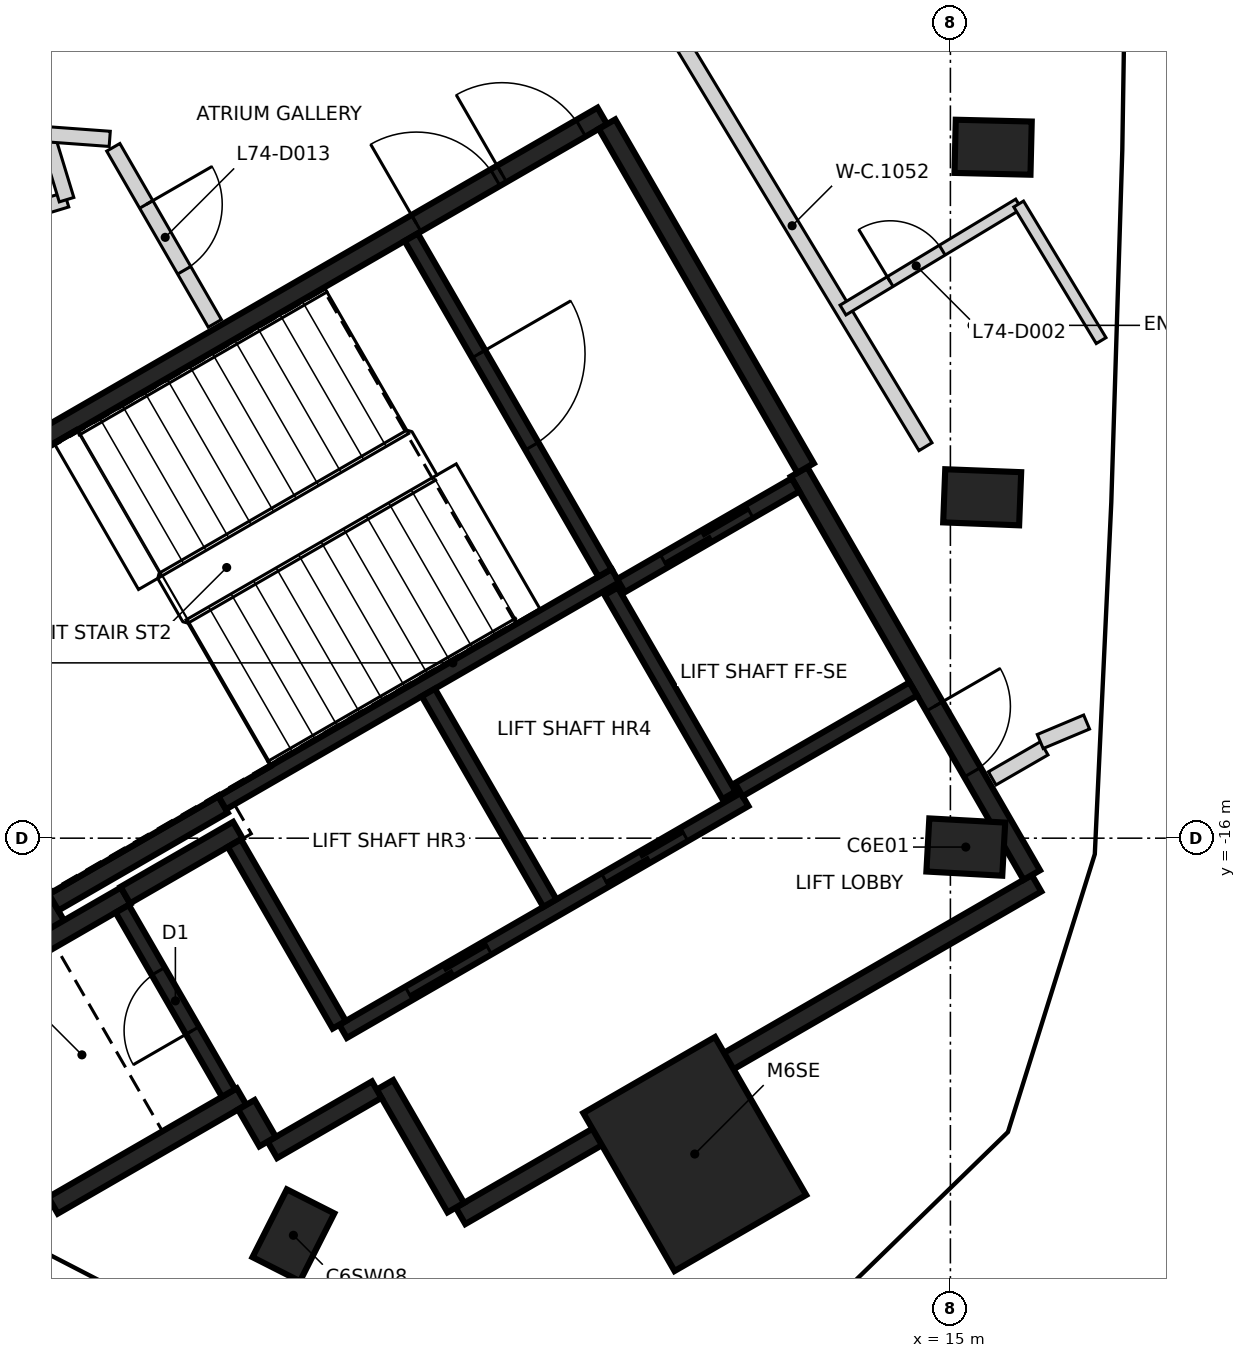
"""IFC4 building model, lengths in metres.
Left out: names, types, materials, properties, quantities, classifications, styles, units other than length and angle.
Written with IfcOpenShell. Run it as: python <this file> out.ifc"""

import sys

from ifc_helpers import new_model, si_unit, direction, frame, frame_2d, origin, origin_2d, place, context, subcontext, project, spatial, rectangle, extrude, element, fill, save


model = new_model("IFC4")
c1 = context("Model", 3, precision=1e-05, world=origin(), true_north=direction((0.0, 1.0)))
c2 = subcontext(c1, "Body", "Model", "MODEL_VIEW")
j1 = project(units=[si_unit("LENGTHUNIT", "METRE"), si_unit("PLANEANGLEUNIT", "RADIAN")], contexts=[c1])
p1 = place(None, origin())
s1 = spatial("IfcSite", under=j1, at=p1, CompositionType="ELEMENT")
p2 = place(p1, origin())
s2 = spatial("IfcBuilding", under=s1, at=p2, CompositionType="ELEMENT")
p3 = place(p2, frame((0.0, 0.0, 294.6)))
s3 = spatial("IfcBuildingStorey", under=s2, at=p3, CompositionType="ELEMENT", Elevation=294.6)
for number, where, z_axis, x_axis in (
    (1, (15.202, -16.117, -0.35), (0.0, 0.0, 1.0), (-0.998, 0.055, 0.0)),
    (2, (15.418, -11.515, -0.35), (0.0, 0.0, 1.0), (-0.999, 0.039, 0.0)),
    (3, (15.562, -6.91, -0.35), (0.0, 0.0, 1.0), (-1.0, 0.024, 0.0)),
    (4, (6.356, -21.224, -0.35), (0.0, 0.0, 1.0), (0.452, 0.892, 0.0)),
):
    element("IfcColumn", number, at=place(p3, frame(where, z_axis=z_axis, x_axis=x_axis)), inside=s3, PredefinedType="COLUMN", context=c2, shape_type="SweptSolid", body=[
        extrude(rectangle(XDim=1.0, YDim=0.7, at=origin_2d()), origin(), (0.0, 0.0, 1.0), 3.6),
    ])
p4 = place(p3, frame((11.637, -20.155, -0.35), z_axis=(0.0, 0.0, 1.0), x_axis=(-0.5, 0.866025403784, 0.0)))
e5 = element("IfcColumn", 5, at=p4, inside=s3, PredefinedType="COLUMN", context=c2, shape_type="SweptSolid", body=[
    extrude(rectangle(XDim=2.4, YDim=2.0, at=origin_2d()), origin(), (0.0, 0.0, 1.0), 3.6),
])
p5 = place(p3, frame((0.417, -12.273, 0.0), z_axis=(0.0, 0.0, 1.0), x_axis=(0.866021906294, 0.500006057782, 0.0)))
e6 = element("IfcWall", 6, at=p5, inside=s3, PredefinedType="SHEAR", context=c2, shape_type="SweptSolid", body=[
    extrude(rectangle(XDim=11.55, YDim=0.25, at=frame_2d((5.775, 0.0))), origin(), (0.0, 0.0, 1.0), 3.25),
])
p6 = place(p5, frame((10.025, 0.0, 0.0)))
e7 = element("IfcOpeningElement", 7, at=p6, cuts=e6, PredefinedType="OPENING", context=c2, shape_type="SweptSolid", body=[
    extrude(rectangle(XDim=1.2, YDim=2.1, at=frame_2d((0.6, 1.05))), frame((0.0, 0.135, 0.0), z_axis=(0.0, -1.0, 0.0), x_axis=(1.0, 0.0, 0.0)), (0.0, 0.0, 1.0), 0.27),
])
p7 = place(p5, frame((8.725, 0.0, 0.0)))
e8 = element("IfcOpeningElement", 8, at=p7, cuts=e6, PredefinedType="OPENING", context=c2, shape_type="SweptSolid", body=[
    extrude(rectangle(XDim=1.2, YDim=2.1, at=frame_2d((0.6, 1.05))), frame((0.0, 0.135, 0.0), z_axis=(0.0, -1.0, 0.0), x_axis=(1.0, 0.0, 0.0)), (0.0, 0.0, 1.0), 0.27),
])
p8 = place(p3, frame((16.133, -16.594, 0.0), z_axis=(0.0, 0.0, 1.0), x_axis=(-0.866022959057, -0.500004234368, 0.0)))
e9 = element("IfcWall", 9, at=p8, inside=s3, PredefinedType="SHEAR", context=c2, shape_type="SweptSolid", body=[
    extrude(rectangle(XDim=8.75, YDim=0.25, at=frame_2d((4.375, 0.0))), origin(), (0.0, 0.0, 1.0), 3.25),
])
p9 = place(p3, frame((13.008, -11.181, 0.0), z_axis=(0.0, 0.0, 1.0), x_axis=(0.500001955336, -0.866024274868, 0.0)))
e10 = element("IfcWall", 10, at=p9, inside=s3, PredefinedType="SHEAR", context=c2, shape_type="SweptSolid", body=[
    extrude(rectangle(XDim=6.125, YDim=0.25, at=frame_2d((3.062, 0.0))), origin(), (0.0, 0.0, 1.0), 3.25),
])
p10 = place(p9, frame((3.563, 0.0, 0.0)))
e11 = element("IfcOpeningElement", 11, at=p10, cuts=e10, PredefinedType="OPENING", context=c2, shape_type="SweptSolid", body=[
    extrude(rectangle(XDim=1.0, YDim=2.1, at=frame_2d((0.5, 1.05))), frame((0.0, 0.135, 0.0), z_axis=(0.0, -1.0, 0.0), x_axis=(1.0, 0.0, 0.0)), (0.0, 0.0, 1.0), 0.27),
])
p11 = place(p3, frame((3.235, -17.153, 0.0), z_axis=(0.0, 0.0, 1.0), x_axis=(-0.500008851346, 0.866020293397, 0.0)))
e12 = element("IfcWall", 12, at=p11, inside=s3, PredefinedType="SHEAR", context=c2, shape_type="SweptSolid", body=[
    extrude(rectangle(XDim=5.51, YDim=0.25, at=frame_2d((2.755, 0.0))), origin(), (0.0, 0.0, 1.0), 3.25),
])
p12 = place(p3, frame((10.483, -6.606, 0.0), z_axis=(0.0, 0.0, 1.0), x_axis=(0.49999885962, -0.866026062182, 0.0)))
e13 = element("IfcWall", 13, at=p12, inside=s3, PredefinedType="SHEAR", context=c2, shape_type="SweptSolid", body=[
    extrude(rectangle(XDim=5.225, YDim=0.25, at=frame_2d((2.612, 0.0))), origin(), (0.0, 0.0, 1.0), 3.25),
])
p13 = place(p3, frame((3.085, -20.894, 0.0), z_axis=(0.0, 0.0, 1.0), x_axis=(-0.499978833458, 0.866037623948, 0.0)))
e14 = element("IfcWall", 14, at=p13, inside=s3, PredefinedType="SHEAR", context=c2, shape_type="SweptSolid", body=[
    extrude(rectangle(XDim=3.05, YDim=0.25, at=frame_2d((1.525, 0.0))), origin(), (0.0, 0.0, 1.0), 3.25),
])
p14 = place(p3, frame((1.669, -18.19, 0.0), z_axis=(0.0, 0.0, 1.0), x_axis=(0.866042235819, 0.499970844928, 0.0)))
e15 = element("IfcWall", 15, at=p14, inside=s3, PredefinedType="SHEAR", context=c2, shape_type="SweptSolid", body=[
    extrude(rectangle(XDim=2.865, YDim=0.25, at=frame_2d((1.432, 0.0))), origin(), (0.0, 0.0, 1.0), 3.25),
])
p15 = place(p3, frame((5.675, -19.399, 0.0), z_axis=(0.0, 0.0, 1.0), x_axis=(-0.866026637627, -0.499997862916, 0.0)))
e16 = element("IfcWall", 16, at=p15, inside=s3, PredefinedType="SHEAR", context=c2, shape_type="SweptSolid", body=[
    extrude(rectangle(XDim=2.865, YDim=0.25, at=frame_2d((1.432, 0.0))), origin(), (0.0, 0.0, 1.0), 3.25),
])
p16 = place(p3, frame((5.431, -15.556, 0.0), z_axis=(0.0, 0.0, 1.0), x_axis=(-0.866022940537, -0.500004266446, 0.0)))
e17 = element("IfcWall", 17, at=p16, inside=s3, PredefinedType="SHEAR", context=c2, shape_type="SweptSolid", body=[
    extrude(rectangle(XDim=2.575, YDim=0.25, at=frame_2d((1.287, 0.0))), origin(), (0.0, 0.0, 1.0), 3.25),
])
p17 = place(p3, frame((8.493, -20.86, 0.0), z_axis=(0.0, 0.0, 1.0), x_axis=(-0.500039802285, 0.866002422705, 0.0)))
e18 = element("IfcWall", 18, at=p17, inside=s3, PredefinedType="SHEAR", context=c2, shape_type="SweptSolid", body=[
    extrude(rectangle(XDim=1.865, YDim=0.25, at=frame_2d((0.932, 0.0))), origin(), (0.0, 0.0, 1.0), 3.25),
])
p18 = place(p3, frame((4.145, -16.749, 0.0), z_axis=(0.0, 0.0, 1.0), x_axis=(0.866038183914, 0.499977863513, 0.0)))
e19 = element("IfcWall", 19, at=p18, inside=s3, PredefinedType="SHEAR", context=c2, shape_type="SweptSolid", body=[
    extrude(rectangle(XDim=1.71, YDim=0.25, at=frame_2d((0.855, 0.0))), origin(), (0.0, 0.0, 1.0), 3.25),
])
p19 = place(p3, frame((7.452, -19.308, 0.0), z_axis=(0.0, 0.0, 1.0), x_axis=(-0.866044474677, -0.49996696679, 0.0)))
e20 = element("IfcWall", 20, at=p19, inside=s3, PredefinedType="SHEAR", context=c2, shape_type="SweptSolid", body=[
    extrude(rectangle(XDim=1.584, YDim=0.25, at=frame_2d((0.792, 0.0))), origin(), (0.0, 0.0, 1.0), 3.25),
])
p20 = place(p3, frame((6.017, -19.992, 0.0), z_axis=(0.0, 0.0, 1.0), x_axis=(-0.500364886717, 0.865814633822, 0.0)))
e21 = element("IfcWall", 21, at=p20, inside=s3, PredefinedType="SHEAR", context=c2, shape_type="SweptSolid", body=[
    extrude(rectangle(XDim=0.559, YDim=0.25, at=frame_2d((0.28, 0.0))), origin(), (0.0, 0.0, 1.0), 3.25),
])
p21 = place(p3, frame((5.419, -15.534, 0.0), z_axis=(0.0, 0.0, 1.0), x_axis=(0.866029065029, 0.499993658486, 0.0)))
e22 = element("IfcWall", 22, at=p21, inside=s3, PredefinedType="SHEAR", context=c2, shape_type="SweptSolid", body=[
    extrude(rectangle(XDim=5.974, YDim=0.2, at=frame_2d((2.987, 0.0))), origin(), (0.0, 0.0, 1.0), 3.25),
])
p22 = place(p3, frame((7.01, -18.542, 0.0), z_axis=(0.0, 0.0, 1.0), x_axis=(0.866030299012, 0.499991521122, 0.0)))
e23 = element("IfcWall", 23, at=p22, inside=s3, PredefinedType="SHEAR", context=c2, shape_type="SweptSolid", body=[
    extrude(rectangle(XDim=6.1, YDim=0.2, at=frame_2d((3.05, 0.0))), origin(), (0.0, 0.0, 1.0), 3.25),
])
p23 = place(p22, frame((1.0, 0.0, 0.0)))
e24 = element("IfcOpeningElement", 24, at=p23, cuts=e23, PredefinedType="OPENING", context=c2, shape_type="SweptSolid", body=[
    extrude(rectangle(XDim=1.2, YDim=2.1, at=frame_2d((0.6, 1.05))), frame((0.0, 0.11, 0.0), z_axis=(0.0, -1.0, 0.0), x_axis=(1.0, 0.0, 0.0)), (0.0, 0.0, 1.0), 0.22),
])
p24 = place(p22, frame((3.982, 0.0, 0.0)))
e25 = element("IfcOpeningElement", 25, at=p24, cuts=e23, PredefinedType="OPENING", context=c2, shape_type="SweptSolid", body=[
    extrude(rectangle(XDim=1.2, YDim=2.1, at=frame_2d((0.6, 1.05))), frame((0.0, 0.11, 0.0), z_axis=(0.0, -1.0, 0.0), x_axis=(1.0, 0.0, 0.0)), (0.0, 0.0, 1.0), 0.22),
])
p25 = place(p3, frame((7.906, -8.094, 0.0), z_axis=(0.0, 0.0, 1.0), x_axis=(0.500027839223, -0.866009330205, 0.0)))
e26 = element("IfcWall", 26, at=p25, inside=s3, PredefinedType="SHEAR", context=c2, shape_type="SweptSolid", body=[
    extrude(rectangle(XDim=5.098, YDim=0.2, at=frame_2d((2.549, 0.0))), origin(), (0.0, 0.0, 1.0), 3.25),
])
p26 = place(p25, frame((1.774, 0.0, 0.0)))
e27 = element("IfcOpeningElement", 27, at=p26, cuts=e26, PredefinedType="OPENING", context=c2, shape_type="SweptSolid", body=[
    extrude(rectangle(XDim=1.4, YDim=2.1, at=frame_2d((0.7, 1.05))), frame((0.0, 0.11, 0.0), z_axis=(0.0, -1.0, 0.0), x_axis=(1.0, 0.0, 0.0)), (0.0, 0.0, 1.0), 0.22),
])
p27 = place(p3, frame((8.132, -14.084, 0.0), z_axis=(0.0, 0.0, 1.0), x_axis=(0.499997778408, -0.866026686418, 0.0)))
e28 = element("IfcWall", 28, at=p27, inside=s3, PredefinedType="SHEAR", context=c2, shape_type="SweptSolid", body=[
    extrude(rectangle(XDim=3.198, YDim=0.2, at=frame_2d((1.599, 0.0))), origin(), (0.0, 0.0, 1.0), 3.25),
])
p28 = place(p3, frame((5.503, -19.352, 0.0), z_axis=(0.0, 0.0, 1.0), x_axis=(-0.499986818241, 0.866033014143, 0.0)))
e29 = element("IfcWall", 29, at=p28, inside=s3, PredefinedType="SHEAR", context=c2, shape_type="SweptSolid", body=[
    extrude(rectangle(XDim=2.798, YDim=0.2, at=frame_2d((1.399, 0.0))), origin(), (0.0, 0.0, 1.0), 3.25),
])
p29 = place(p28, frame((0.949, 0.0, 0.0)))
e30 = element("IfcOpeningElement", 30, at=p29, cuts=e29, PredefinedType="OPENING", context=c2, shape_type="SweptSolid", body=[
    extrude(rectangle(XDim=0.9, YDim=2.1, at=frame_2d((0.45, 1.05))), frame((0.0, 0.11, 0.0), z_axis=(0.0, -1.0, 0.0), x_axis=(1.0, 0.0, 0.0)), (0.0, 0.0, 1.0), 0.22),
])
p30 = place(p3, frame((6.96, -18.455, 0.0), z_axis=(0.0, 0.0, 1.0), x_axis=(-0.499926705758, 0.866067716099, 0.0)))
e31 = element("IfcWall", 31, at=p30, inside=s3, PredefinedType="SHEAR", context=c2, shape_type="SweptSolid", body=[
    extrude(rectangle(XDim=2.759, YDim=0.2, at=frame_2d((1.38, 0.0))), origin(), (0.0, 0.0, 1.0), 3.25),
])
p31 = place(p3, frame((12.088, -15.437, 0.0), z_axis=(0.0, 0.0, 1.0), x_axis=(-0.500026960575, 0.86600983753, 0.0)))
e32 = element("IfcWall", 32, at=p31, inside=s3, PredefinedType="SHEAR", context=c2, shape_type="SweptSolid", body=[
    extrude(rectangle(XDim=3.1, YDim=0.2, at=frame_2d((1.55, 0.0))), origin(), (0.0, 0.0, 1.0), 3.25),
])
p32 = place(p3, frame((10.666, -12.678, 0.0), z_axis=(0.0, 0.0, 1.0), x_axis=(0.866018407898, 0.500012117035, 0.0)))
e33 = element("IfcWall", 33, at=p32, inside=s3, PredefinedType="SHEAR", context=c2, shape_type="SweptSolid", body=[
    extrude(rectangle(XDim=2.651, YDim=0.2, at=frame_2d((1.325, 0.0))), origin(), (0.0, 0.0, 1.0), 3.25),
])
p33 = place(p32, frame((0.652, 0.0, 0.0)))
e34 = element("IfcOpeningElement", 34, at=p33, cuts=e33, PredefinedType="OPENING", context=c2, shape_type="SweptSolid", body=[
    extrude(rectangle(XDim=1.3, YDim=2.1, at=frame_2d((0.65, 1.05))), frame((0.0, 0.11, 0.0), z_axis=(0.0, -1.0, 0.0), x_axis=(1.0, 0.0, 0.0)), (0.0, 0.0, 1.0), 0.22),
])
p34 = place(p3, frame((14.512, -14.037, 0.0), z_axis=(0.0, 0.0, 1.0), x_axis=(-0.866018407898, -0.500012117035, 0.0)))
e35 = element("IfcWall", 35, at=p34, inside=s3, PredefinedType="SHEAR", context=c2, shape_type="SweptSolid", body=[
    extrude(rectangle(XDim=2.651, YDim=0.2, at=frame_2d((1.325, 0.0))), origin(), (0.0, 0.0, 1.0), 3.25),
])
p35 = place(p3, frame((2.591, -7.837, 0.0), z_axis=(0.0, 0.0, 1.0), x_axis=(0.956974070788, 0.290173444409, 0.0)))
e36 = element("IfcWall", 36, at=p35, inside=s3, PredefinedType="PARTITIONING", context=c2, shape_type="SweptSolid", body=[
    extrude(rectangle(XDim=0.816, YDim=0.2, at=frame_2d((0.408, 0.0))), origin(), (0.0, 0.0, 1.0), 3.25),
])
p36 = place(p3, frame((3.11, -6.739, 0.0), z_axis=(0.0, 0.0, 1.0), x_axis=(0.291053676179, -0.95670672496, 0.0)))
e37 = element("IfcWall", 37, at=p36, inside=s3, PredefinedType="PARTITIONING", context=c2, shape_type="SweptSolid", body=[
    extrude(rectangle(XDim=0.9, YDim=0.2, at=frame_2d((0.45, 0.0))), origin(), (0.0, 0.0, 1.0), 3.25),
])
p37 = place(p3, frame((3.11, -6.739, 0.0), z_axis=(0.0, 0.0, 1.0), x_axis=(0.997306047238, -0.073352901386, 0.0)))
e38 = element("IfcWall", 38, at=p37, inside=s3, PredefinedType="PARTITIONING", context=c2, shape_type="SweptSolid", body=[
    extrude(rectangle(XDim=0.832, YDim=0.2, at=frame_2d((0.416, 0.0))), origin(), (0.0, 0.0, 1.0), 3.25),
])
p38 = place(p3, frame((3.987, -6.911, 0.0), z_axis=(0.0, 0.0, 1.0), x_axis=(0.499458942258, -0.866337558345, 0.0)))
e39 = element("IfcWall", 39, at=p38, inside=s3, PredefinedType="PARTITIONING", context=c2, shape_type="SweptSolid", body=[
    extrude(rectangle(XDim=2.674, YDim=0.2, at=frame_2d((1.337, 0.0))), origin(), (0.0, 0.0, 1.0), 3.25),
])
p39 = place(p38, frame((0.867, 0.0, 0.0)))
e40 = element("IfcOpeningElement", 40, at=p39, cuts=e39, PredefinedType="OPENING", context=c2, shape_type="SweptSolid", body=[
    extrude(rectangle(XDim=1.0, YDim=2.1, at=frame_2d((0.5, 1.05))), frame((0.0, 0.11, 0.0), z_axis=(0.0, -1.0, 0.0), x_axis=(1.0, 0.0, 0.0)), (0.0, 0.0, 1.0), 0.22),
])
p40 = place(p3, frame((11.163, -5.036, 0.0), z_axis=(0.0, 0.0, 1.0), x_axis=(0.516730398198, -0.856148173845, 0.0)))
e41 = element("IfcWall", 41, at=p40, inside=s3, PredefinedType="PARTITIONING", context=c2, shape_type="SweptSolid", body=[
    extrude(rectangle(XDim=6.791, YDim=0.2, at=frame_2d((3.396, 0.0))), origin(), (0.0, 0.0, 1.0), 3.25),
])
p41 = place(p3, frame((15.55, -15.213, 0.0), z_axis=(0.0, 0.0, 1.0), x_axis=(0.865989998118, 0.500061319399, 0.0)))
e42 = element("IfcWall", 42, at=p41, inside=s3, PredefinedType="PARTITIONING", context=c2, shape_type="SweptSolid", body=[
    extrude(rectangle(XDim=0.79, YDim=0.2, at=frame_2d((0.395, 0.0))), origin(), (0.0, 0.0, 1.0), 3.25),
])
p42 = place(p3, frame((16.182, -14.728, 0.0), z_axis=(0.0, 0.0, 1.0), x_axis=(0.922058491377, 0.387050563207, 0.0)))
e43 = element("IfcWall", 43, at=p42, inside=s3, PredefinedType="PARTITIONING", context=c2, shape_type="SweptSolid", body=[
    extrude(rectangle(XDim=0.662, YDim=0.2, at=frame_2d((0.331, 0.0))), origin(), (0.0, 0.0, 1.0), 3.25),
])
p43 = place(p3, frame((13.587, -9.052, 0.0), z_axis=(0.0, 0.0, 1.0), x_axis=(0.856117294569, 0.516781557275, 0.0)))
e44 = element("IfcWall", 44, at=p43, inside=s3, PredefinedType="PARTITIONING", context=c2, shape_type="SweptSolid", body=[
    extrude(rectangle(XDim=2.699, YDim=0.15, at=frame_2d((1.35, 0.0))), origin(), (0.0, 0.0, 1.0), 2.35),
])
p44 = place(p43, frame((0.725, 0.0, 0.0)))
e45 = element("IfcOpeningElement", 45, at=p44, cuts=e44, PredefinedType="OPENING", context=c2, shape_type="SweptSolid", body=[
    extrude(rectangle(XDim=0.8, YDim=2.1, at=frame_2d((0.4, 1.05))), frame((0.0, 0.085, 0.0), z_axis=(0.0, -1.0, 0.0), x_axis=(1.0, 0.0, 0.0)), (0.0, 0.0, 1.0), 0.17),
])
p45 = place(p3, frame((15.898, -7.657, 0.0), z_axis=(0.0, 0.0, 1.0), x_axis=(0.516836936411, -0.856083863393, 0.0)))
e46 = element("IfcWall", 46, at=p45, inside=s3, PredefinedType="PARTITIONING", context=c2, shape_type="SweptSolid", body=[
    extrude(rectangle(XDim=2.099, YDim=0.15, at=frame_2d((1.05, 0.0))), origin(), (0.0, 0.0, 1.0), 3.25),
])
p46 = place(p33, origin())
e47 = element("IfcDoor", 47, at=p46, inside=s3, OperationType="SLIDING_TO_LEFT", PredefinedType="DOOR", context=c2, shape_type="SweptSolid", body=[
    extrude(rectangle(XDim=1.3, YDim=2.1, at=frame_2d((0.65, 1.05))), frame((0.0, 0.025, 0.0), z_axis=(0.0, -1.0, 0.0), x_axis=(1.0, 0.0, 0.0)), (0.0, 0.0, 1.0), 0.05),
])
fill(e34, e47)
p47 = place(p23, origin())
e48 = element("IfcDoor", 48, at=p47, inside=s3, OperationType="DOUBLE_DOOR_SLIDING", PredefinedType="DOOR", context=c2, shape_type="SweptSolid", body=[
    extrude(rectangle(XDim=1.2, YDim=2.1, at=frame_2d((0.6, 1.05))), frame((0.0, 0.025, 0.0), z_axis=(0.0, -1.0, 0.0), x_axis=(1.0, 0.0, 0.0)), (0.0, 0.0, 1.0), 0.05),
])
fill(e24, e48)
p48 = place(p24, origin())
e49 = element("IfcDoor", 49, at=p48, inside=s3, OperationType="DOUBLE_DOOR_SLIDING", PredefinedType="DOOR", context=c2, shape_type="SweptSolid", body=[
    extrude(rectangle(XDim=1.2, YDim=2.1, at=frame_2d((0.6, 1.05))), frame((0.0, 0.025, 0.0), z_axis=(0.0, -1.0, 0.0), x_axis=(1.0, 0.0, 0.0)), (0.0, 0.0, 1.0), 0.05),
])
fill(e25, e49)
p49 = place(p10, origin())
e50 = element("IfcDoor", 50, at=p49, inside=s3, OperationType="SINGLE_SWING_LEFT", PredefinedType="DOOR", context=c2, shape_type="SweptSolid", body=[
    extrude(rectangle(XDim=1.0, YDim=2.1, at=frame_2d((0.5, 1.05))), frame((0.0, 0.025, 0.0), z_axis=(0.0, -1.0, 0.0), x_axis=(1.0, 0.0, 0.0)), (0.0, 0.0, 1.0), 0.05),
])
fill(e11, e50)
p50 = place(p6, origin())
e51 = element("IfcDoor", 51, at=p50, inside=s3, OperationType="SINGLE_SWING_LEFT", PredefinedType="DOOR", context=c2, shape_type="SweptSolid", body=[
    extrude(rectangle(XDim=1.2, YDim=2.1, at=frame_2d((0.6, 1.05))), frame((0.0, 0.025, 0.0), z_axis=(0.0, -1.0, 0.0), x_axis=(1.0, 0.0, 0.0)), (0.0, 0.0, 1.0), 0.05),
])
fill(e7, e51)
p51 = place(p7, origin())
e52 = element("IfcDoor", 52, at=p51, inside=s3, OperationType="SINGLE_SWING_RIGHT", PredefinedType="DOOR", context=c2, shape_type="SweptSolid", body=[
    extrude(rectangle(XDim=1.2, YDim=2.1, at=frame_2d((0.6, 1.05))), frame((0.0, 0.025, 0.0), z_axis=(0.0, -1.0, 0.0), x_axis=(1.0, 0.0, 0.0)), (0.0, 0.0, 1.0), 0.05),
])
fill(e8, e52)
p52 = place(p26, origin())
e53 = element("IfcDoor", 53, at=p52, inside=s3, OperationType="SINGLE_SWING_LEFT", PredefinedType="DOOR", context=c2, shape_type="SweptSolid", body=[
    extrude(rectangle(XDim=1.4, YDim=2.1, at=frame_2d((0.7, 1.05))), frame((0.0, 0.025, 0.0), z_axis=(0.0, -1.0, 0.0), x_axis=(1.0, 0.0, 0.0)), (0.0, 0.0, 1.0), 0.05),
])
fill(e27, e53)
p53 = place(p29, origin())
e54 = element("IfcDoor", 54, at=p53, inside=s3, OperationType="SINGLE_SWING_RIGHT", PredefinedType="DOOR", context=c2, shape_type="SweptSolid", body=[
    extrude(rectangle(XDim=0.9, YDim=2.1, at=frame_2d((0.45, 1.05))), frame((0.0, 0.025, 0.0), z_axis=(0.0, -1.0, 0.0), x_axis=(1.0, 0.0, 0.0)), (0.0, 0.0, 1.0), 0.05),
])
fill(e30, e54)
p54 = place(p44, origin())
e55 = element("IfcDoor", 55, at=p54, inside=s3, OperationType="SINGLE_SWING_LEFT", PredefinedType="DOOR", context=c2, shape_type="SweptSolid", body=[
    extrude(rectangle(XDim=0.8, YDim=2.1, at=frame_2d((0.4, 1.05))), frame((0.0, 0.025, 0.0), z_axis=(0.0, -1.0, 0.0), x_axis=(1.0, 0.0, 0.0)), (0.0, 0.0, 1.0), 0.05),
])
fill(e45, e55)
p55 = place(p39, frame((1.0, 0.0, 0.0), z_axis=(0.0, 0.0, 1.0), x_axis=(-1.0, 0.0, 0.0)))
e56 = element("IfcDoor", 56, at=p55, inside=s3, OperationType="SINGLE_SWING_LEFT", PredefinedType="DOOR", context=c2, shape_type="SweptSolid", body=[
    extrude(rectangle(XDim=1.0, YDim=2.1, at=frame_2d((0.5, 1.05))), frame((0.0, 0.025, 0.0), z_axis=(0.0, -1.0, 0.0), x_axis=(1.0, 0.0, 0.0)), (0.0, 0.0, 1.0), 0.05),
])
fill(e40, e56)
save(model, sys.argv[1])
